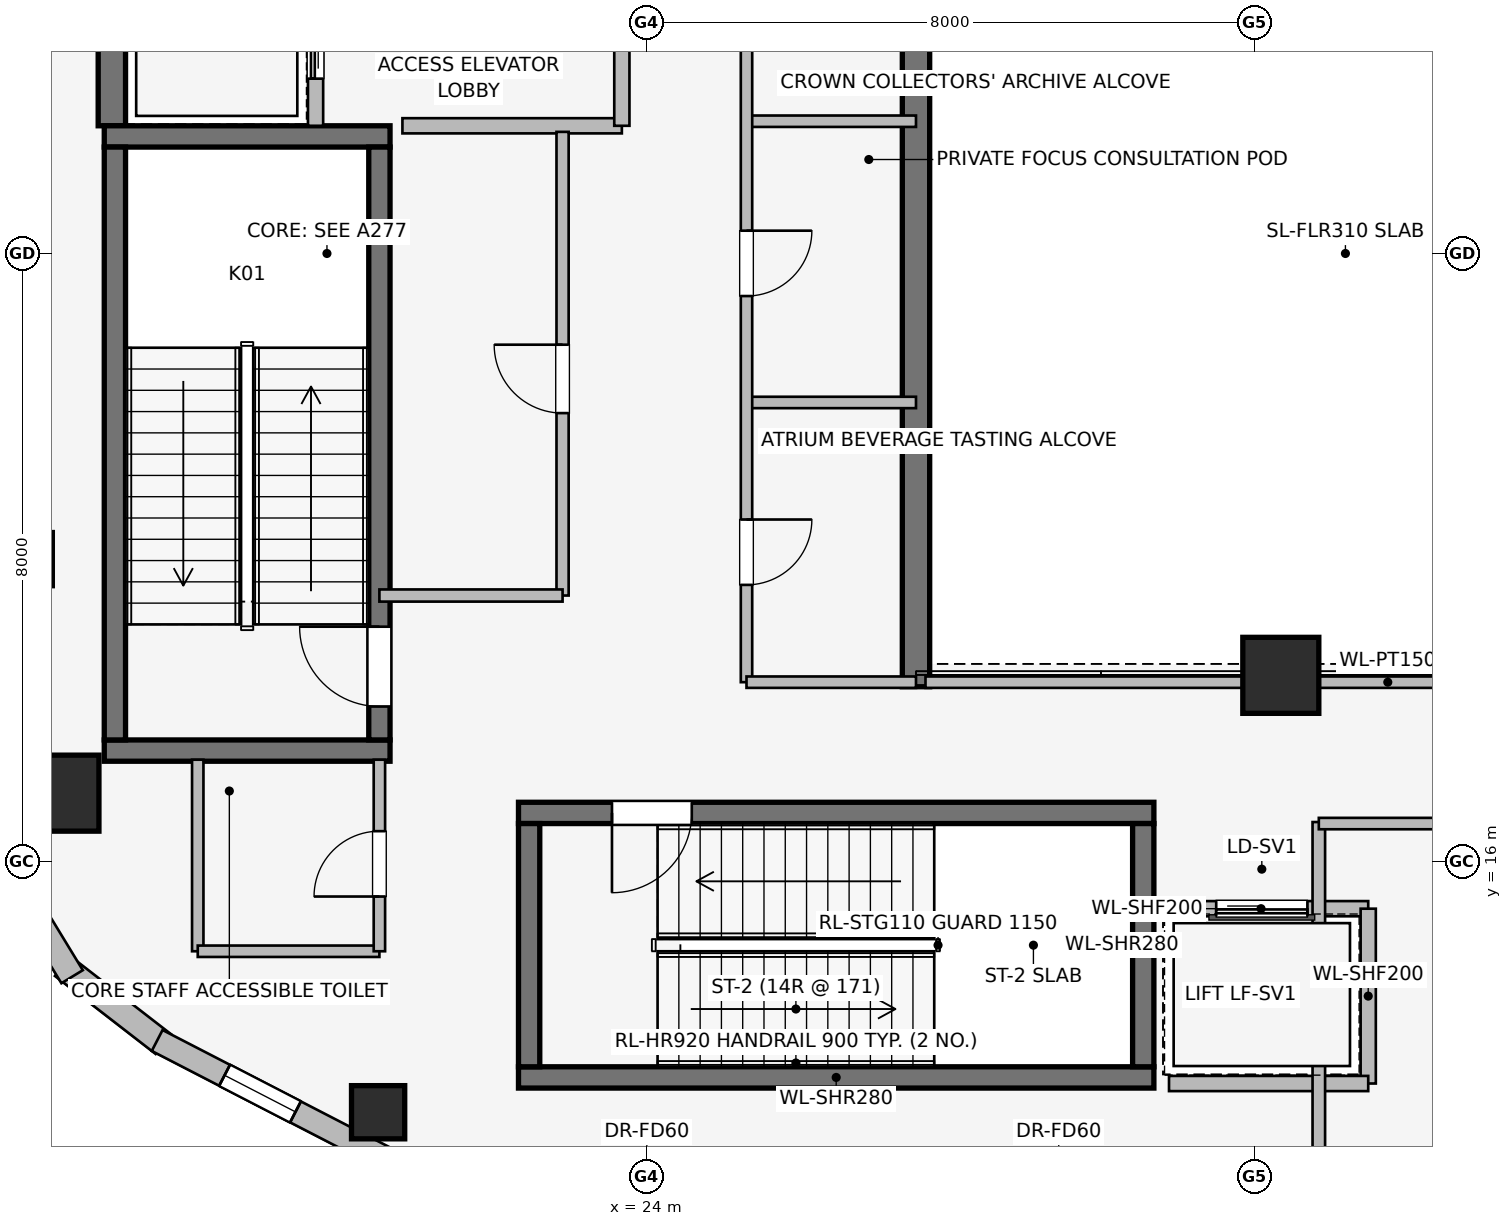
"""IFC4 building model, lengths in metres.
Left out: names, types, materials, properties, quantities, classifications, styles, units other than length and angle.
Written with IfcOpenShell. Run it as: python <this file> out.ifc"""

import sys

from ifc_helpers import new_model, si_unit, direction, frame, frame_2d, origin, origin_2d, place, context, subcontext, project, spatial, rectangle, extrude, element, fill, save


model = new_model("IFC4")
c1 = context("Model", 3, precision=1e-05, world=origin(), true_north=direction((0.0, 1.0)))
c2 = subcontext(c1, "Body", "Model", "MODEL_VIEW")
j1 = project(units=[si_unit("LENGTHUNIT", "METRE"), si_unit("PLANEANGLEUNIT", "RADIAN")], contexts=[c1])
p1 = place(None, origin())
s1 = spatial("IfcSite", under=j1, at=p1, CompositionType="ELEMENT")
p2 = place(p1, origin())
s2 = spatial("IfcBuilding", under=s1, at=p2, CompositionType="ELEMENT")
p3 = place(p2, frame((0.0, 0.0, 275.1)))
s3 = spatial("IfcBuildingStorey", under=s2, at=p3, CompositionType="ELEMENT", Elevation=275.1)
p4 = place(p3, frame((16.97, 25.68, 0.0), z_axis=(0.0, 0.0, 1.0), x_axis=(0.0, 1.0, 0.0)))
e1 = element("IfcWall", 1, at=p4, inside=s3, PredefinedType="SHEAR", context=c2, shape_type="SweptSolid", body=[
    extrude(rectangle(XDim=5.62, YDim=0.36, at=frame_2d((2.81, 0.0))), origin(), (0.0, 0.0, 1.0), 4.8),
])
p5 = place(p3, frame((27.55, 29.55, 0.0), z_axis=(0.0, 0.0, 1.0), x_axis=(0.0, -1.0, 0.0)))
e2 = element("IfcWall", 2, at=p5, inside=s3, PredefinedType="SHEAR", context=c2, shape_type="SweptSolid", body=[
    extrude(rectangle(XDim=11.25, YDim=0.36, at=frame_2d((5.625, 0.0))), origin(), (0.0, 0.0, 1.0), 4.8),
])
for number, where, z_axis, x_axis in (
    (3, (16.87, 17.46, 0.0), (0.0, 0.0, 1.0), (1.0, 0.0, 0.0)),
    (4, (20.63, 25.54, 0.0), (0.0, 0.0, 1.0), (-1.0, 0.0, 0.0)),
):
    element("IfcWall", number, at=place(p3, frame(where, z_axis=z_axis, x_axis=x_axis)), inside=s3, PredefinedType="SHEAR", context=c2, shape_type="SweptSolid", body=[
        extrude(rectangle(XDim=3.76, YDim=0.28, at=frame_2d((1.88, 0.0))), origin(), (0.0, 0.0, 1.0), 4.8),
    ])
p6 = place(p3, frame((17.01, 25.4, 0.0), z_axis=(0.0, 0.0, 1.0), x_axis=(0.0, -1.0, 0.0)))
e5 = element("IfcWall", 5, at=p6, inside=s3, PredefinedType="SHEAR", context=c2, shape_type="SweptSolid", body=[
    extrude(rectangle(XDim=7.8, YDim=0.28, at=frame_2d((3.9, 0.0))), origin(), (0.0, 0.0, 1.0), 4.8),
])
p7 = place(p3, frame((20.49, 17.6, 0.0), z_axis=(0.0, 0.0, 1.0), x_axis=(0.0, 1.0, 0.0)))
e6 = element("IfcWall", 6, at=p7, inside=s3, PredefinedType="SHEAR", context=c2, shape_type="SweptSolid", body=[
    extrude(rectangle(XDim=7.8, YDim=0.28, at=frame_2d((3.9, 0.0))), origin(), (0.0, 0.0, 1.0), 4.8),
])
p8 = place(p7, frame((0.44, 0.0, 0.0)))
e7 = element("IfcOpeningElement", 7, at=p8, cuts=e6, PredefinedType="OPENING", context=c2, shape_type="SweptSolid", body=[
    extrude(rectangle(XDim=1.05, YDim=2.0, at=frame_2d((0.525, 1.0))), frame((0.0, 0.15, 0.0), z_axis=(0.0, -1.0, 0.0), x_axis=(1.0, 0.0, 0.0)), (0.0, 0.0, 1.0), 0.3),
])
p9 = place(p3, frame((22.32, 13.16, 0.0), z_axis=(0.0, 0.0, 1.0), x_axis=(1.0, 0.0, 0.0)))
e8 = element("IfcWall", 8, at=p9, inside=s3, PredefinedType="SHEAR", context=c2, shape_type="SweptSolid", body=[
    extrude(rectangle(XDim=8.36, YDim=0.28, at=frame_2d((4.18, 0.0))), origin(), (0.0, 0.0, 1.0), 4.8),
])
p10 = place(p3, frame((30.68, 16.64, 0.0), z_axis=(0.0, 0.0, 1.0), x_axis=(-1.0, 0.0, 0.0)))
e9 = element("IfcWall", 9, at=p10, inside=s3, PredefinedType="SHEAR", context=c2, shape_type="SweptSolid", body=[
    extrude(rectangle(XDim=8.36, YDim=0.28, at=frame_2d((4.18, 0.0))), origin(), (0.0, 0.0, 1.0), 4.8),
])
p11 = place(p10, frame((6.08, 0.0, 0.0)))
e10 = element("IfcOpeningElement", 10, at=p11, cuts=e9, PredefinedType="OPENING", context=c2, shape_type="SweptSolid", body=[
    extrude(rectangle(XDim=1.05, YDim=2.0, at=frame_2d((0.525, 1.0))), frame((0.0, 0.15, 0.0), z_axis=(0.0, -1.0, 0.0), x_axis=(1.0, 0.0, 0.0)), (0.0, 0.0, 1.0), 0.3),
])
for number, where, z_axis, x_axis in (
    (11, (22.46, 16.5, 0.0), (0.0, 0.0, 1.0), (0.0, -1.0, 0.0)),
    (12, (30.54, 13.3, 0.0), (0.0, 0.0, 1.0), (0.0, 1.0, 0.0)),
):
    element("IfcWall", number, at=place(p3, frame(where, z_axis=z_axis, x_axis=x_axis)), inside=s3, PredefinedType="SHEAR", context=c2, shape_type="SweptSolid", body=[
        extrude(rectangle(XDim=3.2, YDim=0.28, at=frame_2d((1.6, 0.0))), origin(), (0.0, 0.0, 1.0), 4.8),
    ])
for number, where, z_axis, x_axis in (
    (13, (16.3, 16.9, 0.0), (0.0, 0.0, 1.0), (1.0, 0.0, 0.0)),
    (14, (32.35, 18.45, 0.0), (0.0, 0.0, 1.0), (1.0, 0.0, 0.0)),
):
    element("IfcColumn", number, at=place(p3, frame(where, z_axis=z_axis, x_axis=x_axis)), inside=s3, PredefinedType="COLUMN", context=c2, shape_type="SweptSolid", body=[
        extrude(rectangle(XDim=1.0, YDim=1.0, at=origin_2d()), origin(), (0.0, 0.0, 1.0), 4.8),
    ])
p12 = place(p3, frame((20.473, 12.702, 0.0), z_axis=(0.0, 0.0, 1.0), x_axis=(1.0, 0.0, 0.0)))
e15 = element("IfcColumn", 15, at=p12, inside=s3, PredefinedType="COLUMN", context=c2, shape_type="SweptSolid", body=[
    extrude(rectangle(XDim=0.7, YDim=0.7, at=origin_2d()), origin(), (0.0, 0.0, 1.0), 4.8),
])
p13 = place(p3, frame((17.647, 13.599, 0.0), z_axis=(0.0, 0.0, 1.0), x_axis=(-0.790691856293, 0.61221433207, 0.0)))
e16 = element("IfcWall", 16, at=p13, inside=s3, PredefinedType="STANDARD", context=c2, shape_type="SweptSolid", body=[
    extrude(rectangle(XDim=1.676, YDim=0.33, at=frame_2d((0.838, 0.0))), origin(), (0.0, 0.0, 1.0), 4.49),
])
p14 = place(p3, frame((16.447, 14.485, 0.0), z_axis=(0.0, 0.0, 1.0), x_axis=(-0.520325409202, 0.853968072318, 0.0)))
e17 = element("IfcWall", 17, at=p14, inside=s3, PredefinedType="STANDARD", context=c2, shape_type="SweptSolid", body=[
    extrude(rectangle(XDim=1.678, YDim=0.33, at=frame_2d((0.839, 0.0))), origin(), (0.0, 0.0, 1.0), 4.49),
])
p15 = place(p3, frame((21.317, 11.71, 0.0), z_axis=(0.0, 0.0, 1.0), x_axis=(-0.888616094641, 0.45865175934, 0.0)))
e18 = element("IfcWall", 18, at=p15, inside=s3, PredefinedType="STANDARD", context=c2, shape_type="SweptSolid", body=[
    extrude(rectangle(XDim=4.221, YDim=0.31, at=frame_2d((2.111, 0.0))), origin(), (0.0, 0.0, 1.0), 4.49),
])
p16 = place(p15, frame((2.173, 0.0, 0.75)))
e19 = element("IfcOpeningElement", 19, at=p16, cuts=e18, PredefinedType="OPENING", context=c2, shape_type="SweptSolid", body=[
    extrude(rectangle(XDim=1.05, YDim=1.4, at=frame_2d((0.525, 0.7))), frame((0.0, 0.165, 0.0), z_axis=(0.0, -1.0, 0.0), x_axis=(1.0, 0.0, 0.0)), (0.0, 0.0, 1.0), 0.33),
])
p17 = place(p3, frame((19.65, 25.68, 0.0), z_axis=(0.0, 0.0, 1.0), x_axis=(0.0, 1.0, 0.0)))
e20 = element("IfcWall", 20, at=p17, inside=s3, PredefinedType="PARTITIONING", context=c2, shape_type="SweptSolid", body=[
    extrude(rectangle(XDim=5.54, YDim=0.2, at=frame_2d((2.77, 0.0))), origin(), (0.0, 0.0, 1.0), 4.49),
])
p18 = place(p17, frame((0.62, 0.0, 0.0)))
e21 = element("IfcOpeningElement", 21, at=p18, cuts=e20, PredefinedType="OPENING", context=c2, shape_type="SweptSolid", body=[
    extrude(rectangle(XDim=1.1, YDim=2.2, at=frame_2d((0.55, 1.1))), frame((0.0, 0.11, 0.0), z_axis=(0.0, -1.0, 0.0), x_axis=(1.0, 0.0, 0.0)), (0.0, 0.0, 1.0), 0.22),
])
p19 = place(p17, frame((3.12, 0.0, 0.0)))
e22 = element("IfcOpeningElement", 22, at=p19, cuts=e20, PredefinedType="OPENING", context=c2, shape_type="SweptSolid", body=[
    extrude(rectangle(XDim=1.1, YDim=2.2, at=frame_2d((0.55, 1.1))), frame((0.0, 0.11, 0.0), z_axis=(0.0, -1.0, 0.0), x_axis=(1.0, 0.0, 0.0)), (0.0, 0.0, 1.0), 0.22),
])
p20 = place(p3, frame((20.793, 25.68, 0.0), z_axis=(0.0, 0.0, 1.0), x_axis=(1.0, 0.0, 0.0)))
e23 = element("IfcWall", 23, at=p20, inside=s3, PredefinedType="PARTITIONING", context=c2, shape_type="SweptSolid", body=[
    extrude(rectangle(XDim=2.887, YDim=0.2, at=frame_2d((1.443, 0.0))), origin(), (0.0, 0.0, 1.0), 4.49),
])
p21 = place(p3, frame((23.68, 25.68, 0.0), z_axis=(0.0, 0.0, 1.0), x_axis=(0.0, 1.0, 0.0)))
e24 = element("IfcWall", 24, at=p21, inside=s3, PredefinedType="PARTITIONING", context=c2, shape_type="SweptSolid", body=[
    extrude(rectangle(XDim=5.54, YDim=0.2, at=frame_2d((2.77, 0.0))), origin(), (0.0, 0.0, 1.0), 4.49),
])
p22 = place(p21, frame((1.8, 0.0, 0.0)))
e25 = element("IfcOpeningElement", 25, at=p22, cuts=e24, PredefinedType="OPENING", context=c2, shape_type="SweptSolid", body=[
    extrude(rectangle(XDim=1.05, YDim=2.0, at=frame_2d((0.525, 1.0))), frame((0.0, 0.11, 0.0), z_axis=(0.0, -1.0, 0.0), x_axis=(1.0, 0.0, 0.0)), (0.0, 0.0, 1.0), 0.22),
])
p23 = place(p3, frame((33.5, 15.38, 0.0), z_axis=(0.0, 0.0, 1.0), x_axis=(-1.0, 0.0, 0.0)))
e26 = element("IfcWall", 26, at=p23, inside=s3, PredefinedType="PARTITIONING", context=c2, shape_type="SweptSolid", body=[
    extrude(rectangle(XDim=2.82, YDim=0.2, at=frame_2d((1.41, 0.0))), origin(), (0.0, 0.0, 1.0), 4.49),
])
p24 = place(p23, frame((0.8, 0.0, 0.0)))
e27 = element("IfcOpeningElement", 27, at=p24, cuts=e26, PredefinedType="OPENING", context=c2, shape_type="SweptSolid", body=[
    extrude(rectangle(XDim=1.2, YDim=2.2, at=frame_2d((0.6, 1.1))), frame((0.0, 0.11, 0.0), z_axis=(0.0, -1.0, 0.0), x_axis=(1.0, 0.0, 0.0)), (0.0, 0.0, 1.0), 0.22),
])
p25 = place(p3, frame((33.5, 13.08, 0.0), z_axis=(0.0, 0.0, 1.0), x_axis=(0.0, 1.0, 0.0)))
e28 = element("IfcWall", 28, at=p25, inside=s3, PredefinedType="PARTITIONING", context=c2, shape_type="SweptSolid", body=[
    extrude(rectangle(XDim=2.3, YDim=0.2, at=frame_2d((1.15, 0.0))), origin(), (0.0, 0.0, 1.0), 4.49),
])
p26 = place(p3, frame((30.879, 13.08, 0.0), z_axis=(0.0, 0.0, 1.0), x_axis=(1.0, 0.0, 0.0)))
e29 = element("IfcWall", 29, at=p26, inside=s3, PredefinedType="PARTITIONING", context=c2, shape_type="SweptSolid", body=[
    extrude(rectangle(XDim=2.621, YDim=0.2, at=frame_2d((1.311, 0.0))), origin(), (0.0, 0.0, 1.0), 4.49),
])
p27 = place(p3, frame((22.9, 19.5, 0.0), z_axis=(0.0, 0.0, 1.0), x_axis=(0.0, 1.0, 0.0)))
e30 = element("IfcWall", 30, at=p27, inside=s3, PredefinedType="PARTITIONING", context=c2, shape_type="SweptSolid", body=[
    extrude(rectangle(XDim=6.1, YDim=0.16, at=frame_2d((3.05, 0.0))), origin(), (0.0, 0.0, 1.0), 4.49),
])
p28 = place(p27, frame((2.4, 0.0, 0.0)))
e31 = element("IfcOpeningElement", 31, at=p28, cuts=e30, PredefinedType="OPENING", context=c2, shape_type="SweptSolid", body=[
    extrude(rectangle(XDim=0.9, YDim=2.0, at=frame_2d((0.45, 1.0))), frame((0.0, 0.09, 0.0), z_axis=(0.0, -1.0, 0.0), x_axis=(1.0, 0.0, 0.0)), (0.0, 0.0, 1.0), 0.18),
])
p29 = place(p3, frame((20.49, 19.5, 0.0), z_axis=(0.0, 0.0, 1.0), x_axis=(1.0, 0.0, 0.0)))
e32 = element("IfcWall", 32, at=p29, inside=s3, PredefinedType="PARTITIONING", context=c2, shape_type="SweptSolid", body=[
    extrude(rectangle(XDim=2.41, YDim=0.16, at=frame_2d((1.205, 0.0))), origin(), (0.0, 0.0, 1.0), 3.39),
])
for number, where, z_axis, x_axis in (
    (33, (25.32, 22.04, 0.0), (0.0, 0.0, 1.0), (1.0, 0.0, 0.0)),
    (34, (25.32, 25.74, 0.0), (0.0, 0.0, 1.0), (1.0, 0.0, 0.0)),
):
    element("IfcWall", number, at=place(p3, frame(where, z_axis=z_axis, x_axis=x_axis)), inside=s3, PredefinedType="PARTITIONING", context=c2, shape_type="SweptSolid", body=[
        extrude(rectangle(XDim=2.23, YDim=0.15, at=frame_2d((1.115, 0.0))), origin(), (0.0, 0.0, 1.0), 4.49),
    ])
p30 = place(p3, frame((25.32, 29.55, 0.0), z_axis=(0.0, 0.0, 1.0), x_axis=(0.0, -1.0, 0.0)))
e35 = element("IfcWall", 35, at=p30, inside=s3, PredefinedType="PARTITIONING", context=c2, shape_type="SweptSolid", body=[
    extrude(rectangle(XDim=11.19, YDim=0.15, at=frame_2d((5.595, 0.0))), origin(), (0.0, 0.0, 1.0), 4.49),
])
p31 = place(p30, frame((1.4, 0.0, 0.0)))
e36 = element("IfcOpeningElement", 36, at=p31, cuts=e35, PredefinedType="OPENING", context=c2, shape_type="SweptSolid", body=[
    extrude(rectangle(XDim=0.86, YDim=2.0, at=frame_2d((0.43, 1.0))), frame((0.0, 0.085, 0.0), z_axis=(0.0, -1.0, 0.0), x_axis=(1.0, 0.0, 0.0)), (0.0, 0.0, 1.0), 0.17),
])
p32 = place(p30, frame((5.25, 0.0, 0.0)))
e37 = element("IfcOpeningElement", 37, at=p32, cuts=e35, PredefinedType="OPENING", context=c2, shape_type="SweptSolid", body=[
    extrude(rectangle(XDim=0.86, YDim=2.0, at=frame_2d((0.43, 1.0))), frame((0.0, 0.085, 0.0), z_axis=(0.0, -1.0, 0.0), x_axis=(1.0, 0.0, 0.0)), (0.0, 0.0, 1.0), 0.17),
])
p33 = place(p30, frame((9.05, 0.0, 0.0)))
e38 = element("IfcOpeningElement", 38, at=p33, cuts=e35, PredefinedType="OPENING", context=c2, shape_type="SweptSolid", body=[
    extrude(rectangle(XDim=0.86, YDim=2.0, at=frame_2d((0.43, 1.0))), frame((0.0, 0.085, 0.0), z_axis=(0.0, -1.0, 0.0), x_axis=(1.0, 0.0, 0.0)), (0.0, 0.0, 1.0), 0.17),
])
p34 = place(p3, frame((25.32, 18.36, 0.0), z_axis=(0.0, 0.0, 1.0), x_axis=(1.0, 0.0, 0.0)))
e39 = element("IfcWall", 39, at=p34, inside=s3, PredefinedType="PARTITIONING", context=c2, shape_type="SweptSolid", body=[
    extrude(rectangle(XDim=2.23, YDim=0.15, at=frame_2d((1.115, 0.0))), origin(), (0.0, 0.0, 1.0), 4.49),
])
p35 = place(p3, frame((18.1, 17.34, 0.0), z_axis=(0.0, 0.0, 1.0), x_axis=(0.0, -1.0, 0.0)))
e40 = element("IfcWall", 40, at=p35, inside=s3, PredefinedType="PARTITIONING", context=c2, shape_type="SweptSolid", body=[
    extrude(rectangle(XDim=2.52, YDim=0.15, at=frame_2d((1.26, 0.0))), origin(), (0.0, 0.0, 1.0), 4.49),
])
p36 = place(p3, frame((18.1, 14.82, 0.0), z_axis=(0.0, 0.0, 1.0), x_axis=(1.0, 0.0, 0.0)))
e41 = element("IfcWall", 41, at=p36, inside=s3, PredefinedType="PARTITIONING", context=c2, shape_type="SweptSolid", body=[
    extrude(rectangle(XDim=2.39, YDim=0.15, at=frame_2d((1.195, 0.0))), origin(), (0.0, 0.0, 1.0), 4.49),
])
p37 = place(p3, frame((20.49, 14.82, 0.0), z_axis=(0.0, 0.0, 1.0), x_axis=(0.0, 1.0, 0.0)))
e42 = element("IfcWall", 42, at=p37, inside=s3, PredefinedType="PARTITIONING", context=c2, shape_type="SweptSolid", body=[
    extrude(rectangle(XDim=2.52, YDim=0.15, at=frame_2d((1.26, 0.0))), origin(), (0.0, 0.0, 1.0), 4.49),
])
p38 = place(p37, frame((0.72, 0.0, 0.0)))
e43 = element("IfcOpeningElement", 43, at=p38, cuts=e42, PredefinedType="OPENING", context=c2, shape_type="SweptSolid", body=[
    extrude(rectangle(XDim=0.86, YDim=2.0, at=frame_2d((0.43, 1.0))), frame((0.0, 0.085, 0.0), z_axis=(0.0, -1.0, 0.0), x_axis=(1.0, 0.0, 0.0)), (0.0, 0.0, 1.0), 0.17),
])
p39 = place(p3, frame((27.675, 18.36, 0.0), z_axis=(0.0, 0.0, 1.0), x_axis=(1.0, 0.0, 0.0)))
e44 = element("IfcWall", 44, at=p39, inside=s3, PredefinedType="PARTITIONING", context=c2, shape_type="SweptSolid", body=[
    extrude(rectangle(XDim=12.165, YDim=0.15, at=frame_2d((6.083, 0.0))), origin(), (0.0, 0.0, 1.0), 3.631),
])
p40 = place(p3, frame((32.85, 6.124, 0.0), z_axis=(0.0, 0.0, 1.0), x_axis=(0.0, 1.0, 0.0)))
e45 = element("IfcWall", 45, at=p40, inside=s3, PredefinedType="PARTITIONING", context=c2, shape_type="SweptSolid", body=[
    extrude(rectangle(XDim=10.396, YDim=0.165, at=frame_2d((5.198, 0.0))), origin(), (0.0, 0.0, 1.0), 4.49),
])
p41 = place(p3, frame((32.85, 16.5, 0.0), z_axis=(0.0, 0.0, 1.0), x_axis=(1.0, 0.0, 0.0)))
e46 = element("IfcWall", 46, at=p41, inside=s3, PredefinedType="PARTITIONING", context=c2, shape_type="SweptSolid", body=[
    extrude(rectangle(XDim=5.061, YDim=0.15, at=frame_2d((2.53, 0.0))), origin(), (0.0, 0.0, 1.0), 4.49),
])
p42 = place(p41, frame((2.051, 0.0, 0.0)))
e47 = element("IfcOpeningElement", 47, at=p42, cuts=e46, PredefinedType="OPENING", context=c2, shape_type="SweptSolid", body=[
    extrude(rectangle(XDim=0.96, YDim=2.0, at=frame_2d((0.48, 1.0))), frame((0.0, 0.085, 0.0), z_axis=(0.0, -1.0, 0.0), x_axis=(1.0, 0.0, 0.0)), (0.0, 0.0, 1.0), 0.17),
])
p43 = place(p16, origin())
e48 = element("IfcWindow", 48, at=p43, inside=s3, PartitioningType="SINGLE_PANEL", PredefinedType="WINDOW", context=c2, shape_type="SweptSolid", body=[
    extrude(rectangle(XDim=1.05, YDim=1.4, at=frame_2d((0.525, 0.7))), frame((0.0, 0.03, 0.0), z_axis=(0.0, -1.0, 0.0), x_axis=(1.0, 0.0, 0.0)), (0.0, 0.0, 1.0), 0.06),
])
fill(e19, e48)
p44 = place(p8, origin())
e49 = element("IfcDoor", 49, at=p44, inside=s3, OperationType="SINGLE_SWING_RIGHT", PredefinedType="DOOR", context=c2, shape_type="SweptSolid", body=[
    extrude(rectangle(XDim=1.05, YDim=2.0, at=frame_2d((0.525, 1.0))), frame((0.0, 0.025, 0.0), z_axis=(0.0, -1.0, 0.0), x_axis=(1.0, 0.0, 0.0)), (0.0, 0.0, 1.0), 0.05),
])
fill(e7, e49)
p45 = place(p11, origin())
e50 = element("IfcDoor", 50, at=p45, inside=s3, OperationType="SINGLE_SWING_RIGHT", PredefinedType="DOOR", context=c2, shape_type="SweptSolid", body=[
    extrude(rectangle(XDim=1.05, YDim=2.0, at=frame_2d((0.525, 1.0))), frame((0.0, 0.025, 0.0), z_axis=(0.0, -1.0, 0.0), x_axis=(1.0, 0.0, 0.0)), (0.0, 0.0, 1.0), 0.05),
])
fill(e10, e50)
p46 = place(p18, origin())
e51 = element("IfcDoor", 51, at=p46, inside=s3, OperationType="SLIDING_TO_LEFT", PredefinedType="DOOR", context=c2, shape_type="SweptSolid", body=[
    extrude(rectangle(XDim=1.1, YDim=2.2, at=frame_2d((0.55, 1.1))), frame((0.0, 0.025, 0.0), z_axis=(0.0, -1.0, 0.0), x_axis=(1.0, 0.0, 0.0)), (0.0, 0.0, 1.0), 0.05),
])
fill(e21, e51)
p47 = place(p24, origin())
e52 = element("IfcDoor", 52, at=p47, inside=s3, OperationType="SLIDING_TO_RIGHT", PredefinedType="DOOR", context=c2, shape_type="SweptSolid", body=[
    extrude(rectangle(XDim=1.2, YDim=2.2, at=frame_2d((0.6, 1.1))), frame((0.0, 0.025, 0.0), z_axis=(0.0, -1.0, 0.0), x_axis=(1.0, 0.0, 0.0)), (0.0, 0.0, 1.0), 0.05),
])
fill(e27, e52)
p48 = place(p28, origin())
e53 = element("IfcDoor", 53, at=p48, inside=s3, OperationType="SINGLE_SWING_RIGHT", PredefinedType="DOOR", context=c2, shape_type="SweptSolid", body=[
    extrude(rectangle(XDim=0.9, YDim=2.0, at=frame_2d((0.45, 1.0))), frame((0.0, 0.025, 0.0), z_axis=(0.0, -1.0, 0.0), x_axis=(1.0, 0.0, 0.0)), (0.0, 0.0, 1.0), 0.05),
])
fill(e31, e53)
p49 = place(p32, origin())
e54 = element("IfcDoor", 54, at=p49, inside=s3, OperationType="SINGLE_SWING_LEFT", PredefinedType="DOOR", context=c2, shape_type="SweptSolid", body=[
    extrude(rectangle(XDim=0.86, YDim=2.0, at=frame_2d((0.43, 1.0))), frame((0.0, 0.025, 0.0), z_axis=(0.0, -1.0, 0.0), x_axis=(1.0, 0.0, 0.0)), (0.0, 0.0, 1.0), 0.05),
])
fill(e37, e54)
p50 = place(p33, origin())
e55 = element("IfcDoor", 55, at=p50, inside=s3, OperationType="SINGLE_SWING_LEFT", PredefinedType="DOOR", context=c2, shape_type="SweptSolid", body=[
    extrude(rectangle(XDim=0.86, YDim=2.0, at=frame_2d((0.43, 1.0))), frame((0.0, 0.025, 0.0), z_axis=(0.0, -1.0, 0.0), x_axis=(1.0, 0.0, 0.0)), (0.0, 0.0, 1.0), 0.05),
])
fill(e38, e55)
p51 = place(p38, origin())
e56 = element("IfcDoor", 56, at=p51, inside=s3, OperationType="SINGLE_SWING_LEFT", PredefinedType="DOOR", context=c2, shape_type="SweptSolid", body=[
    extrude(rectangle(XDim=0.86, YDim=2.0, at=frame_2d((0.43, 1.0))), frame((0.0, 0.025, 0.0), z_axis=(0.0, -1.0, 0.0), x_axis=(1.0, 0.0, 0.0)), (0.0, 0.0, 1.0), 0.05),
])
fill(e43, e56)
save(model, sys.argv[1])
